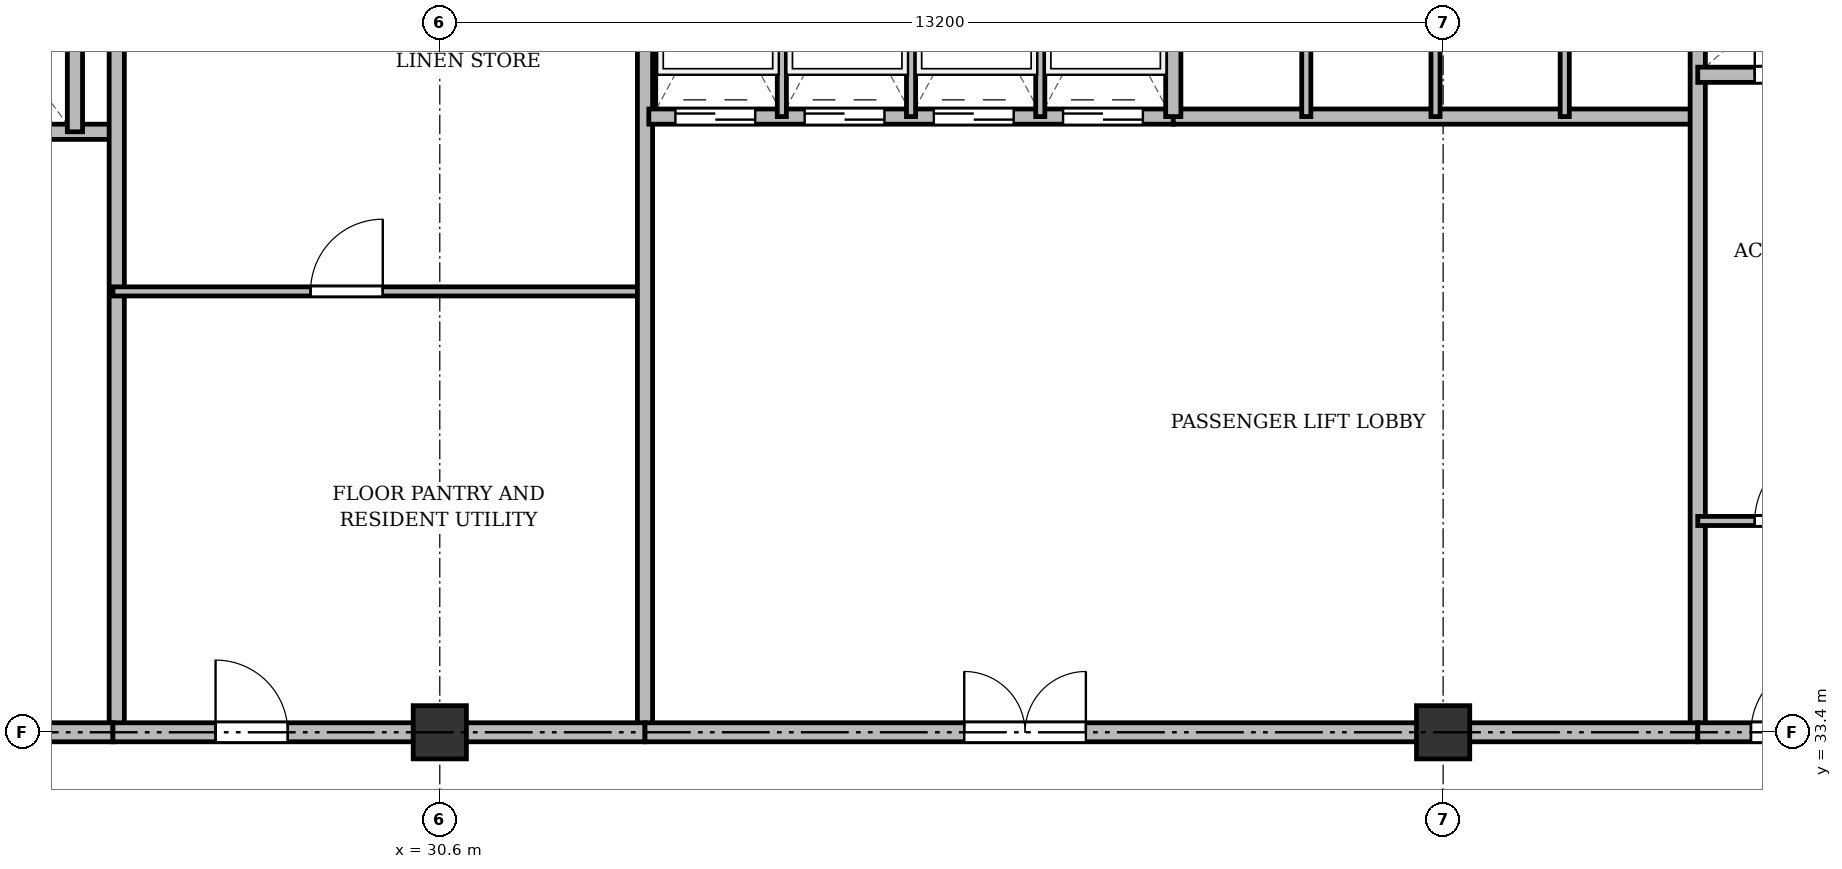
"""IFC4 building model, lengths in metres.
Left out: names, types, materials, properties, quantities, classifications, styles, units other than length and angle.
Written with IfcOpenShell. Run it as: python <this file> out.ifc"""

import sys

from ifc_helpers import new_model, si_unit, direction, frame, frame_2d, origin, origin_2d, place, context, subcontext, project, spatial, rectangle, extrude, source, transform, mapped, element, fill, save


model = new_model("IFC4")
c1 = context("Model", 3, precision=1e-05, world=origin(), true_north=direction((0.0, 1.0)))
c2 = subcontext(c1, "Body", "Model", "MODEL_VIEW")
j1 = project(units=[si_unit("LENGTHUNIT", "METRE"), si_unit("PLANEANGLEUNIT", "RADIAN")], contexts=[c1])
p1 = place(None, origin())
s1 = spatial("IfcSite", under=j1, at=p1, CompositionType="ELEMENT")
p2 = place(p1, origin())
s2 = spatial("IfcBuilding", under=s1, at=p2, CompositionType="ELEMENT")
p3 = place(p2, frame((0.0, 0.0, 142.9)))
s3 = spatial("IfcBuildingStorey", under=s2, at=p3, CompositionType="ELEMENT", Elevation=142.9)
m1 = source(origin(), c2, "Body", "SweptSolid", [
    extrude(rectangle(XDim=0.7, YDim=0.7, at=origin_2d()), origin(), (0.0, 0.0, 1.0), 3.6),
])
for number, where, z_axis, x_axis in (
    (1, (30.6, 33.4, 0.0), (0.0, 0.0, 1.0), (1.0, 0.0, 0.0)),
    (2, (43.8, 33.4, 0.0), (0.0, 0.0, 1.0), (1.0, 0.0, 0.0)),
):
    element("IfcColumn", number, at=place(p3, frame(where, z_axis=z_axis, x_axis=x_axis)), inside=s3, PredefinedType="COLUMN", context=c2, shape_type="MappedRepresentation", body=[
        mapped(m1, transform((0.0, 0.0, 0.0), x_axis=(1.0, 0.0, 0.0), y_axis=(0.0, 1.0, 0.0), z_axis=(0.0, 0.0, 1.0), scale=1.0)),
    ])
p4 = place(p3, frame((19.55, 41.3, 0.0), z_axis=(0.0, 0.0, 1.0), x_axis=(1.0, 0.0, 0.0)))
e3 = element("IfcWall", 3, at=p4, inside=s3, PredefinedType="SOLIDWALL", context=c2, shape_type="SweptSolid", body=[
    extrude(rectangle(XDim=6.75, YDim=0.2, at=frame_2d((3.375, 0.0))), origin(), (0.0, 0.0, 1.0), 3.35),
])
p5 = place(p4, frame((1.7, 0.0, 0.0)))
e4 = element("IfcOpeningElement", 4, at=p5, cuts=e3, PredefinedType="OPENING", context=c2, shape_type="SweptSolid", body=[
    extrude(rectangle(XDim=1.1, YDim=2.15, at=frame_2d((0.55, 1.075))), frame((0.0, 0.11, 0.0), z_axis=(0.0, -1.0, 0.0), x_axis=(1.0, 0.0, 0.0)), (0.0, 0.0, 1.0), 0.22),
])
p6 = place(p4, frame((4.4, 0.0, 0.0)))
e5 = element("IfcOpeningElement", 5, at=p6, cuts=e3, PredefinedType="OPENING", context=c2, shape_type="SweptSolid", body=[
    extrude(rectangle(XDim=1.1, YDim=2.15, at=frame_2d((0.55, 1.075))), frame((0.0, 0.11, 0.0), z_axis=(0.0, -1.0, 0.0), x_axis=(1.0, 0.0, 0.0)), (0.0, 0.0, 1.0), 0.22),
])
p7 = place(p3, frame((25.8, 41.3, 0.0), z_axis=(0.0, 0.0, 1.0), x_axis=(0.0, 1.0, 0.0)))
e6 = element("IfcWall", 6, at=p7, inside=s3, PredefinedType="SOLIDWALL", context=c2, shape_type="SweptSolid", body=[
    extrude(rectangle(XDim=3.4, YDim=0.2, at=frame_2d((1.7, 0.0))), origin(), (0.0, 0.0, 1.0), 3.35),
])
p8 = place(p3, frame((26.35, 33.4, 0.0), z_axis=(0.0, 0.0, 1.0), x_axis=(0.0, 1.0, 0.0)))
e7 = element("IfcWall", 7, at=p8, inside=s3, PredefinedType="SOLIDWALL", context=c2, shape_type="SweptSolid", body=[
    extrude(rectangle(XDim=11.3, YDim=0.2, at=frame_2d((5.65, 0.0))), origin(), (0.0, 0.0, 1.0), 2.75),
])
p9 = place(p3, frame((19.5, 33.4, 0.0), z_axis=(0.0, 0.0, 1.0), x_axis=(1.0, 0.0, 0.0)))
e8 = element("IfcWall", 8, at=p9, inside=s3, PredefinedType="PARTITIONING", context=c2, shape_type="SweptSolid", body=[
    extrude(rectangle(XDim=6.8, YDim=0.25, at=frame_2d((3.4, 0.0))), origin(), (0.0, 0.0, 1.0), 2.75),
])
p10 = place(p9, frame((0.75, 0.0, 0.0)))
e9 = element("IfcOpeningElement", 9, at=p10, cuts=e8, PredefinedType="OPENING", context=c2, shape_type="SweptSolid", body=[
    extrude(rectangle(XDim=1.6, YDim=2.2, at=frame_2d((0.8, 1.1))), frame((0.0, 0.135, 0.0), z_axis=(0.0, -1.0, 0.0), x_axis=(1.0, 0.0, 0.0)), (0.0, 0.0, 1.0), 0.27),
])
p11 = place(p3, frame((26.3, 39.2, 0.0), z_axis=(0.0, 0.0, 1.0), x_axis=(1.0, 0.0, 0.0)))
e10 = element("IfcWall", 10, at=p11, inside=s3, PredefinedType="PARTITIONING", context=c2, shape_type="SweptSolid", body=[
    extrude(rectangle(XDim=7.0, YDim=0.12, at=frame_2d((3.5, 0.0))), origin(), (0.0, 0.0, 1.0), 2.85),
])
p12 = place(p11, frame((2.6, 0.0, 0.0)))
e11 = element("IfcOpeningElement", 11, at=p12, cuts=e10, PredefinedType="OPENING", context=c2, shape_type="SweptSolid", body=[
    extrude(rectangle(XDim=0.95, YDim=2.15, at=frame_2d((0.475, 1.075))), frame((0.0, 0.07, 0.0), z_axis=(0.0, -1.0, 0.0), x_axis=(1.0, 0.0, 0.0)), (0.0, 0.0, 1.0), 0.14),
])
p13 = place(p3, frame((33.3, 33.4, 0.0), z_axis=(0.0, 0.0, 1.0), x_axis=(0.0, 1.0, 0.0)))
e12 = element("IfcWall", 12, at=p13, inside=s3, PredefinedType="SOLIDWALL", context=c2, shape_type="SweptSolid", body=[
    extrude(rectangle(XDim=11.3, YDim=0.2, at=frame_2d((5.65, 0.0))), origin(), (0.0, 0.0, 1.0), 2.75),
])
p14 = place(p3, frame((33.35, 41.5, 0.0), z_axis=(0.0, 0.0, 1.0), x_axis=(1.0, 0.0, 0.0)))
e13 = element("IfcWall", 13, at=p14, inside=s3, PredefinedType="SOLIDWALL", context=c2, shape_type="SweptSolid", body=[
    extrude(rectangle(XDim=6.9, YDim=0.2, at=frame_2d((3.45, 0.0))), origin(), (0.0, 0.0, 1.0), 3.35),
])
p15 = place(p14, frame((0.35, 0.0, 0.0)))
e14 = element("IfcOpeningElement", 14, at=p15, cuts=e13, PredefinedType="OPENING", context=c2, shape_type="SweptSolid", body=[
    extrude(rectangle(XDim=1.05, YDim=2.15, at=frame_2d((0.525, 1.075))), frame((0.0, 0.11, 0.0), z_axis=(0.0, -1.0, 0.0), x_axis=(1.0, 0.0, 0.0)), (0.0, 0.0, 1.0), 0.22),
])
p16 = place(p14, frame((2.05, 0.0, 0.0)))
e15 = element("IfcOpeningElement", 15, at=p16, cuts=e13, PredefinedType="OPENING", context=c2, shape_type="SweptSolid", body=[
    extrude(rectangle(XDim=1.05, YDim=2.15, at=frame_2d((0.525, 1.075))), frame((0.0, 0.11, 0.0), z_axis=(0.0, -1.0, 0.0), x_axis=(1.0, 0.0, 0.0)), (0.0, 0.0, 1.0), 0.22),
])
p17 = place(p14, frame((3.75, 0.0, 0.0)))
e16 = element("IfcOpeningElement", 16, at=p17, cuts=e13, PredefinedType="OPENING", context=c2, shape_type="SweptSolid", body=[
    extrude(rectangle(XDim=1.05, YDim=2.15, at=frame_2d((0.525, 1.075))), frame((0.0, 0.11, 0.0), z_axis=(0.0, -1.0, 0.0), x_axis=(1.0, 0.0, 0.0)), (0.0, 0.0, 1.0), 0.22),
])
p18 = place(p14, frame((5.45, 0.0, 0.0)))
e17 = element("IfcOpeningElement", 17, at=p18, cuts=e13, PredefinedType="OPENING", context=c2, shape_type="SweptSolid", body=[
    extrude(rectangle(XDim=1.05, YDim=2.15, at=frame_2d((0.525, 1.075))), frame((0.0, 0.11, 0.0), z_axis=(0.0, -1.0, 0.0), x_axis=(1.0, 0.0, 0.0)), (0.0, 0.0, 1.0), 0.22),
])
for number, where, z_axis, x_axis in (
    (18, (35.1, 41.5, 0.0), (0.0, 0.0, 1.0), (0.0, 1.0, 0.0)),
    (19, (36.8, 41.5, 0.0), (0.0, 0.0, 1.0), (0.0, 1.0, 0.0)),
    (20, (38.5, 41.5, 0.0), (0.0, 0.0, 1.0), (0.0, 1.0, 0.0)),
):
    element("IfcWall", number, at=place(p3, frame(where, z_axis=z_axis, x_axis=x_axis)), inside=s3, PredefinedType="PARTITIONING", context=c2, shape_type="SweptSolid", body=[
        extrude(rectangle(XDim=3.2, YDim=0.12, at=frame_2d((1.6, 0.0))), origin(), (0.0, 0.0, 1.0), 3.35),
    ])
p19 = place(p3, frame((40.25, 41.5, 0.0), z_axis=(0.0, 0.0, 1.0), x_axis=(1.0, 0.0, 0.0)))
e21 = element("IfcWall", 21, at=p19, inside=s3, PredefinedType="SOLIDWALL", context=c2, shape_type="SweptSolid", body=[
    extrude(rectangle(XDim=6.9, YDim=0.2, at=frame_2d((3.45, 0.0))), origin(), (0.0, 0.0, 1.0), 2.85),
])
p20 = place(p3, frame((40.25, 41.5, 0.0), z_axis=(0.0, 0.0, 1.0), x_axis=(0.0, 1.0, 0.0)))
e22 = element("IfcWall", 22, at=p20, inside=s3, PredefinedType="SOLIDWALL", context=c2, shape_type="SweptSolid", body=[
    extrude(rectangle(XDim=3.2, YDim=0.2, at=frame_2d((1.6, 0.0))), origin(), (0.0, 0.0, 1.0), 3.35),
])
p21 = place(p3, frame((42.0, 41.5, 0.0), z_axis=(0.0, 0.0, 1.0), x_axis=(0.0, 1.0, 0.0)))
e23 = element("IfcWall", 23, at=p21, inside=s3, PredefinedType="PARTITIONING", context=c2, shape_type="SweptSolid", body=[
    extrude(rectangle(XDim=3.2, YDim=0.12, at=frame_2d((1.6, 0.0))), origin(), (0.0, 0.0, 1.0), 3.35),
])
p22 = place(p3, frame((43.7, 41.5, 0.0), z_axis=(0.0, 0.0, 1.0), x_axis=(0.0, 1.0, 0.0)))
e24 = element("IfcWall", 24, at=p22, inside=s3, PredefinedType="PARTITIONING", context=c2, shape_type="SweptSolid", body=[
    extrude(rectangle(XDim=3.2, YDim=0.12, at=frame_2d((1.6, 0.0))), origin(), (0.0, 0.0, 1.0), 2.85),
])
p23 = place(p3, frame((45.4, 41.5, 0.0), z_axis=(0.0, 0.0, 1.0), x_axis=(0.0, 1.0, 0.0)))
e25 = element("IfcWall", 25, at=p23, inside=s3, PredefinedType="PARTITIONING", context=c2, shape_type="SweptSolid", body=[
    extrude(rectangle(XDim=3.2, YDim=0.12, at=frame_2d((1.6, 0.0))), origin(), (0.0, 0.0, 1.0), 3.35),
])
p24 = place(p3, frame((47.15, 33.4, 0.0), z_axis=(0.0, 0.0, 1.0), x_axis=(0.0, 1.0, 0.0)))
e26 = element("IfcWall", 26, at=p24, inside=s3, PredefinedType="SOLIDWALL", context=c2, shape_type="SweptSolid", body=[
    extrude(rectangle(XDim=11.3, YDim=0.2, at=frame_2d((5.65, 0.0))), origin(), (0.0, 0.0, 1.0), 2.75),
])
p25 = place(p3, frame((26.3, 33.4, 0.0), z_axis=(0.0, 0.0, 1.0), x_axis=(1.0, 0.0, 0.0)))
e27 = element("IfcWall", 27, at=p25, inside=s3, PredefinedType="PARTITIONING", context=c2, shape_type="SweptSolid", body=[
    extrude(rectangle(XDim=7.0, YDim=0.25, at=frame_2d((3.5, 0.0))), origin(), (0.0, 0.0, 1.0), 2.75),
])
p26 = place(p25, frame((1.35, 0.0, 0.0)))
e28 = element("IfcOpeningElement", 28, at=p26, cuts=e27, PredefinedType="OPENING", context=c2, shape_type="SweptSolid", body=[
    extrude(rectangle(XDim=0.95, YDim=2.15, at=frame_2d((0.475, 1.075))), frame((0.0, 0.135, 0.0), z_axis=(0.0, -1.0, 0.0), x_axis=(1.0, 0.0, 0.0)), (0.0, 0.0, 1.0), 0.27),
])
p27 = place(p3, frame((33.3, 33.4, 0.0), z_axis=(0.0, 0.0, 1.0), x_axis=(1.0, 0.0, 0.0)))
e29 = element("IfcWall", 29, at=p27, inside=s3, PredefinedType="PARTITIONING", context=c2, shape_type="SweptSolid", body=[
    extrude(rectangle(XDim=13.85, YDim=0.25, at=frame_2d((6.925, 0.0))), origin(), (0.0, 0.0, 1.0), 2.75),
])
p28 = place(p27, frame((4.2, 0.0, 0.0)))
e30 = element("IfcOpeningElement", 30, at=p28, cuts=e29, PredefinedType="OPENING", context=c2, shape_type="SweptSolid", body=[
    extrude(rectangle(XDim=1.6, YDim=2.2, at=frame_2d((0.8, 1.1))), frame((0.0, 0.135, 0.0), z_axis=(0.0, -1.0, 0.0), x_axis=(1.0, 0.0, 0.0)), (0.0, 0.0, 1.0), 0.27),
])
p29 = place(p3, frame((47.15, 42.05, 0.0), z_axis=(0.0, 0.0, 1.0), x_axis=(1.0, 0.0, 0.0)))
e31 = element("IfcWall", 31, at=p29, inside=s3, PredefinedType="SOLIDWALL", context=c2, shape_type="SweptSolid", body=[
    extrude(rectangle(XDim=7.85, YDim=0.2, at=frame_2d((3.925, 0.0))), origin(), (0.0, 0.0, 1.0), 2.85),
])
p30 = place(p29, frame((0.75, 0.0, 0.0)))
e32 = element("IfcOpeningElement", 32, at=p30, cuts=e31, PredefinedType="OPENING", context=c2, shape_type="SweptSolid", body=[
    extrude(rectangle(XDim=0.9, YDim=2.1, at=frame_2d((0.45, 1.05))), frame((0.0, 0.11, 0.0), z_axis=(0.0, -1.0, 0.0), x_axis=(1.0, 0.0, 0.0)), (0.0, 0.0, 1.0), 0.22),
])
p31 = place(p29, frame((3.85, 0.0, 0.0)))
e33 = element("IfcOpeningElement", 33, at=p31, cuts=e31, PredefinedType="OPENING", context=c2, shape_type="SweptSolid", body=[
    extrude(rectangle(XDim=0.9, YDim=2.1, at=frame_2d((0.45, 1.05))), frame((0.0, 0.11, 0.0), z_axis=(0.0, -1.0, 0.0), x_axis=(1.0, 0.0, 0.0)), (0.0, 0.0, 1.0), 0.22),
])
p32 = place(p3, frame((47.15, 36.18, 0.0), z_axis=(0.0, 0.0, 1.0), x_axis=(1.0, 0.0, 0.0)))
e34 = element("IfcWall", 34, at=p32, inside=s3, PredefinedType="PARTITIONING", context=c2, shape_type="SweptSolid", body=[
    extrude(rectangle(XDim=5.3, YDim=0.12, at=frame_2d((2.65, 0.0))), origin(), (0.0, 0.0, 1.0), 2.85),
])
p33 = place(p32, frame((0.75, 0.0, 0.0)))
e35 = element("IfcOpeningElement", 35, at=p33, cuts=e34, PredefinedType="OPENING", context=c2, shape_type="SweptSolid", body=[
    extrude(rectangle(XDim=0.95, YDim=2.15, at=frame_2d((0.475, 1.075))), frame((0.0, 0.07, 0.0), z_axis=(0.0, -1.0, 0.0), x_axis=(1.0, 0.0, 0.0)), (0.0, 0.0, 1.0), 0.14),
])
p34 = place(p32, frame((3.45, 0.0, 0.0)))
e36 = element("IfcOpeningElement", 36, at=p34, cuts=e34, PredefinedType="OPENING", context=c2, shape_type="SweptSolid", body=[
    extrude(rectangle(XDim=0.95, YDim=2.15, at=frame_2d((0.475, 1.075))), frame((0.0, 0.07, 0.0), z_axis=(0.0, -1.0, 0.0), x_axis=(1.0, 0.0, 0.0)), (0.0, 0.0, 1.0), 0.14),
])
p35 = place(p3, frame((47.15, 33.4, 0.0), z_axis=(0.0, 0.0, 1.0), x_axis=(1.0, 0.0, 0.0)))
e37 = element("IfcWall", 37, at=p35, inside=s3, PredefinedType="PARTITIONING", context=c2, shape_type="SweptSolid", body=[
    extrude(rectangle(XDim=11.15, YDim=0.25, at=frame_2d((5.575, 0.0))), origin(), (0.0, 0.0, 1.0), 2.75),
])
p36 = place(p35, frame((0.7, 0.0, 0.0)))
e38 = element("IfcOpeningElement", 38, at=p36, cuts=e37, PredefinedType="OPENING", context=c2, shape_type="SweptSolid", body=[
    extrude(rectangle(XDim=0.95, YDim=2.15, at=frame_2d((0.475, 1.075))), frame((0.0, 0.135, 0.0), z_axis=(0.0, -1.0, 0.0), x_axis=(1.0, 0.0, 0.0)), (0.0, 0.0, 1.0), 0.27),
])
p37 = place(p35, frame((6.0, 0.0, 0.0)))
e39 = element("IfcOpeningElement", 39, at=p37, cuts=e37, PredefinedType="OPENING", context=c2, shape_type="SweptSolid", body=[
    extrude(rectangle(XDim=1.2, YDim=2.15, at=frame_2d((0.6, 1.075))), frame((0.0, 0.135, 0.0), z_axis=(0.0, -1.0, 0.0), x_axis=(1.0, 0.0, 0.0)), (0.0, 0.0, 1.0), 0.27),
])
m2 = source(origin(), c2, "Body", "SweptSolid", [
    extrude(rectangle(XDim=0.95, YDim=2.15, at=frame_2d((0.475, 1.075))), frame((0.0, 0.025, 0.0), z_axis=(0.0, -1.0, 0.0), x_axis=(1.0, 0.0, 0.0)), (0.0, 0.0, 1.0), 0.05),
])
p38 = place(p12, origin())
e40 = element("IfcDoor", 40, at=p38, inside=s3, OperationType="SINGLE_SWING_RIGHT", PredefinedType="DOOR", context=c2, shape_type="MappedRepresentation", body=[
    mapped(m2, transform((0.0, 0.0, 0.0), x_axis=(1.0, 0.0, 0.0), y_axis=(0.0, 1.0, 0.0), z_axis=(0.0, 0.0, 1.0), scale=1.0)),
])
fill(e11, e40)
m3 = source(origin(), c2, "Body", "SweptSolid", [
    extrude(rectangle(XDim=1.05, YDim=2.15, at=frame_2d((0.525, 1.075))), frame((0.0, 0.025, 0.0), z_axis=(0.0, -1.0, 0.0), x_axis=(1.0, 0.0, 0.0)), (0.0, 0.0, 1.0), 0.05),
])
p39 = place(p15, origin())
e41 = element("IfcDoor", 41, at=p39, inside=s3, OperationType="DOUBLE_DOOR_SLIDING", PredefinedType="DOOR", context=c2, shape_type="MappedRepresentation", body=[
    mapped(m3, transform((0.0, 0.0, 0.0), x_axis=(1.0, 0.0, 0.0), y_axis=(0.0, 1.0, 0.0), z_axis=(0.0, 0.0, 1.0), scale=1.0)),
])
fill(e14, e41)
p40 = place(p16, origin())
e42 = element("IfcDoor", 42, at=p40, inside=s3, OperationType="DOUBLE_DOOR_SLIDING", PredefinedType="DOOR", context=c2, shape_type="MappedRepresentation", body=[
    mapped(m3, transform((0.0, 0.0, 0.0), x_axis=(1.0, 0.0, 0.0), y_axis=(0.0, 1.0, 0.0), z_axis=(0.0, 0.0, 1.0), scale=1.0)),
])
fill(e15, e42)
p41 = place(p17, origin())
e43 = element("IfcDoor", 43, at=p41, inside=s3, OperationType="DOUBLE_DOOR_SLIDING", PredefinedType="DOOR", context=c2, shape_type="MappedRepresentation", body=[
    mapped(m3, transform((0.0, 0.0, 0.0), x_axis=(1.0, 0.0, 0.0), y_axis=(0.0, 1.0, 0.0), z_axis=(0.0, 0.0, 1.0), scale=1.0)),
])
fill(e16, e43)
p42 = place(p18, origin())
e44 = element("IfcDoor", 44, at=p42, inside=s3, OperationType="DOUBLE_DOOR_SLIDING", PredefinedType="DOOR", context=c2, shape_type="MappedRepresentation", body=[
    mapped(m3, transform((0.0, 0.0, 0.0), x_axis=(1.0, 0.0, 0.0), y_axis=(0.0, 1.0, 0.0), z_axis=(0.0, 0.0, 1.0), scale=1.0)),
])
fill(e17, e44)
p43 = place(p26, origin())
e45 = element("IfcDoor", 45, at=p43, inside=s3, OperationType="SINGLE_SWING_LEFT", PredefinedType="DOOR", context=c2, shape_type="MappedRepresentation", body=[
    mapped(m2, transform((0.0, 0.0, 0.0), x_axis=(1.0, 0.0, 0.0), y_axis=(0.0, 1.0, 0.0), z_axis=(0.0, 0.0, 1.0), scale=1.0)),
])
fill(e28, e45)
m4 = source(origin(), c2, "Body", "SweptSolid", [
    extrude(rectangle(XDim=1.6, YDim=2.2, at=frame_2d((0.8, 1.1))), frame((0.0, 0.025, 0.0), z_axis=(0.0, -1.0, 0.0), x_axis=(1.0, 0.0, 0.0)), (0.0, 0.0, 1.0), 0.05),
])
p44 = place(p28, origin())
e46 = element("IfcDoor", 46, at=p44, inside=s3, OperationType="DOUBLE_DOOR_SINGLE_SWING", PredefinedType="DOOR", context=c2, shape_type="MappedRepresentation", body=[
    mapped(m4, transform((0.0, 0.0, 0.0), x_axis=(1.0, 0.0, 0.0), y_axis=(0.0, 1.0, 0.0), z_axis=(0.0, 0.0, 1.0), scale=1.0)),
])
fill(e30, e46)
m5 = source(origin(), c2, "Body", "SweptSolid", [
    extrude(rectangle(XDim=0.9, YDim=2.1, at=frame_2d((0.45, 1.05))), frame((0.0, 0.025, 0.0), z_axis=(0.0, -1.0, 0.0), x_axis=(1.0, 0.0, 0.0)), (0.0, 0.0, 1.0), 0.05),
])
p45 = place(p30, origin())
e47 = element("IfcDoor", 47, at=p45, inside=s3, OperationType="SINGLE_SWING_LEFT", PredefinedType="DOOR", context=c2, shape_type="MappedRepresentation", body=[
    mapped(m5, transform((0.0, 0.0, 0.0), x_axis=(1.0, 0.0, 0.0), y_axis=(0.0, 1.0, 0.0), z_axis=(0.0, 0.0, 1.0), scale=1.0)),
])
fill(e32, e47)
p46 = place(p33, origin())
e48 = element("IfcDoor", 48, at=p46, inside=s3, OperationType="SINGLE_SWING_RIGHT", PredefinedType="DOOR", context=c2, shape_type="MappedRepresentation", body=[
    mapped(m2, transform((0.0, 0.0, 0.0), x_axis=(1.0, 0.0, 0.0), y_axis=(0.0, 1.0, 0.0), z_axis=(0.0, 0.0, 1.0), scale=1.0)),
])
fill(e35, e48)
p47 = place(p36, origin())
e49 = element("IfcDoor", 49, at=p47, inside=s3, OperationType="SINGLE_SWING_RIGHT", PredefinedType="DOOR", context=c2, shape_type="MappedRepresentation", body=[
    mapped(m2, transform((0.0, 0.0, 0.0), x_axis=(1.0, 0.0, 0.0), y_axis=(0.0, 1.0, 0.0), z_axis=(0.0, 0.0, 1.0), scale=1.0)),
])
fill(e38, e49)
save(model, sys.argv[1])
